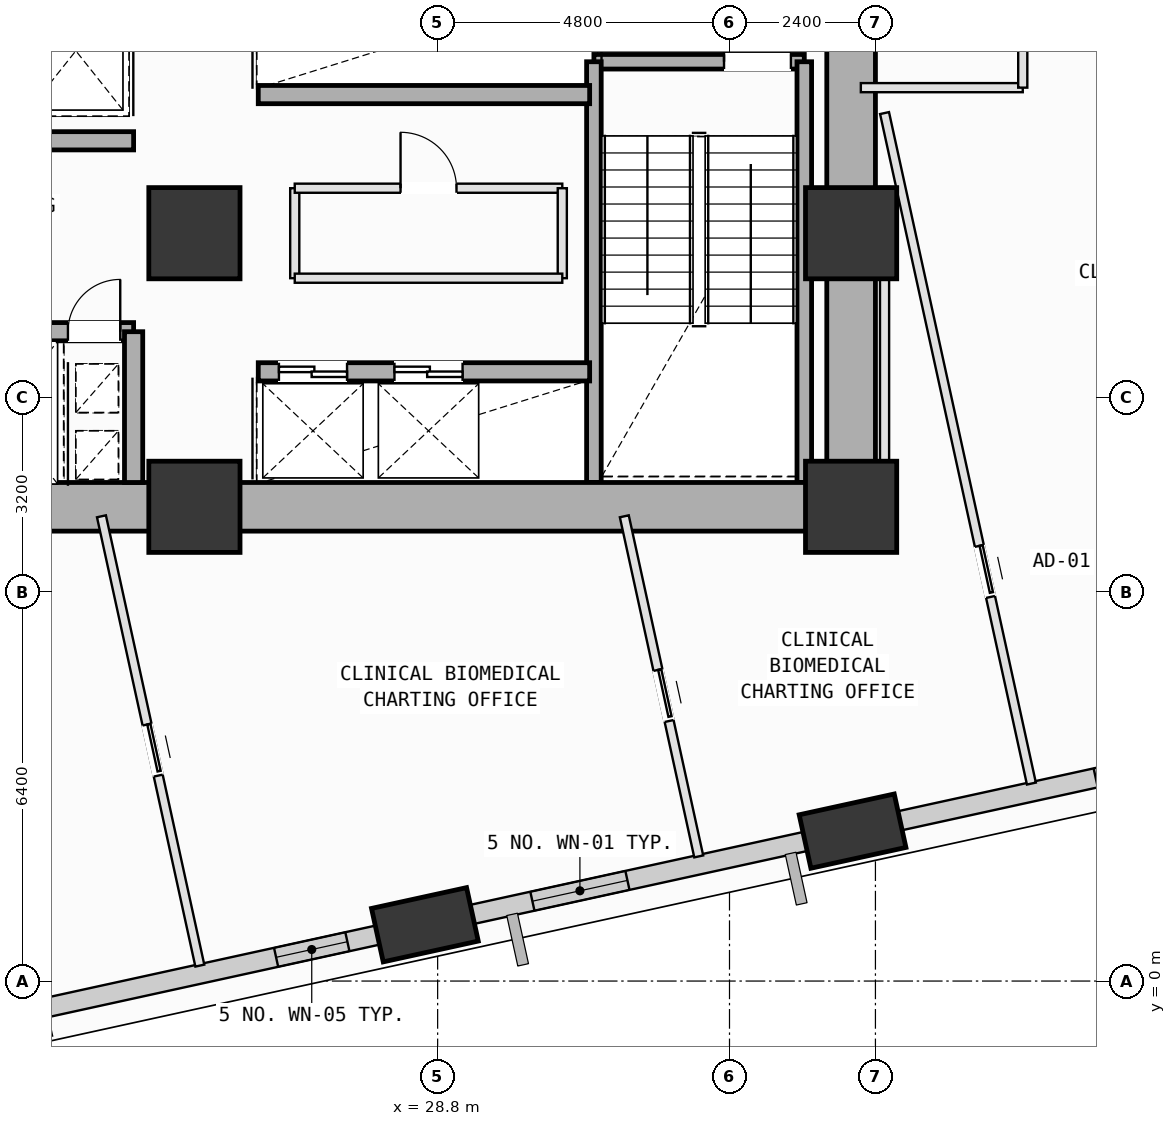
"""IFC4 building model, lengths in metres.
Left out: names, types, materials, properties, quantities, classifications, styles, units other than length and angle.
Written with IfcOpenShell. Run it as: python <this file> out.ifc"""

import sys

from ifc_helpers import new_model, si_unit, direction, frame, frame_2d, origin, origin_2d, place, context, subcontext, project, spatial, rectangle, extrude, element, fill, save


model = new_model("IFC4")
c1 = context("Model", 3, precision=1e-05, world=origin(), true_north=direction((0.0, 1.0)))
c2 = subcontext(c1, "Body", "Model", "MODEL_VIEW")
j1 = project(units=[si_unit("LENGTHUNIT", "METRE"), si_unit("PLANEANGLEUNIT", "RADIAN")], contexts=[c1])
p1 = place(None, origin())
s1 = spatial("IfcSite", under=j1, at=p1, CompositionType="ELEMENT")
p2 = place(p1, origin())
s2 = spatial("IfcBuilding", under=s1, at=p2, CompositionType="ELEMENT")
p3 = place(p2, frame((0.0, 0.0, 75.0)))
s3 = spatial("IfcBuildingStorey", under=s2, at=p3, CompositionType="ELEMENT", Elevation=75.0)
for number, where, z_axis, x_axis in (
    (1, (24.8, 7.8, 0.0), (0.0, 0.0, 1.0), (1.0, 0.0, 0.0)),
    (2, (24.8, 12.3, 0.0), (0.0, 0.0, 1.0), (1.0, 0.0, 0.0)),
    (3, (35.6, 7.8, 0.0), (0.0, 0.0, 1.0), (1.0, 0.0, 0.0)),
    (4, (35.6, 12.3, 0.0), (0.0, 0.0, 1.0), (1.0, 0.0, 0.0)),
):
    element("IfcColumn", number, at=place(p3, frame(where, z_axis=z_axis, x_axis=x_axis)), inside=s3, PredefinedType="COLUMN", context=c2, shape_type="SweptSolid", body=[
        extrude(rectangle(XDim=1.5, YDim=1.5, at=origin_2d()), origin(), (0.0, 0.0, 1.0), 4.0),
    ])
p4 = place(p3, frame((21.557, -0.614, 0.002), z_axis=(0.10503105755, -0.048723246223, 0.99327464592), x_axis=(0.218362783121, 0.975553406611, 0.024763800118)))
e5 = element("IfcColumn", 5, at=p4, inside=s3, PredefinedType="COLUMN", context=c2, shape_type="SweptSolid", body=[
    extrude(rectangle(XDim=1.6, YDim=0.9, at=origin_2d()), origin(), (0.0, 0.0, 1.0), 4.024),
])
p5 = place(p3, frame((28.591, 0.926, 0.002), z_axis=(0.098581386043, -0.019874299159, 0.994930511422), x_axis=(-0.015548115674, 0.999647745462, 0.021509093243)))
e6 = element("IfcColumn", 6, at=p5, inside=s3, PredefinedType="COLUMN", context=c2, shape_type="SweptSolid", body=[
    extrude(rectangle(XDim=1.6, YDim=0.9, at=origin_2d()), origin(), (0.0, 0.0, 1.0), 4.017),
])
p6 = place(p3, frame((35.624, 2.466, 0.002), z_axis=(0.092149700508, 0.009123732724, 0.995703364561), x_axis=(-0.308175869476, 0.951123215459, 0.019805617589)))
e7 = element("IfcColumn", 7, at=p6, inside=s3, PredefinedType="COLUMN", context=c2, shape_type="SweptSolid", body=[
    extrude(rectangle(XDim=1.6, YDim=0.9, at=origin_2d()), origin(), (0.0, 0.0, 1.0), 4.014),
])
p7 = place(p3, frame((28.183, 0.837, 0.0), z_axis=(0.0, 0.0, 1.0), x_axis=(-0.976853849755, -0.213907821782, 0.0)))
e8 = element("IfcWall", 8, at=p7, inside=s3, PredefinedType="SOLIDWALL", context=c2, shape_type="SweptSolid", body=[
    extrude(rectangle(XDim=6.006, YDim=0.32, at=frame_2d((3.003, 0.0))), origin(), (0.0, 0.0, 1.0), 3.165),
])
p8 = place(p7, frame((0.888, 0.0, 0.75)))
e9 = element("IfcOpeningElement", 9, at=p8, cuts=e8, PredefinedType="OPENING", context=c2, shape_type="SweptSolid", body=[
    extrude(rectangle(XDim=1.2, YDim=1.75, at=frame_2d((0.6, 0.875))), frame((0.0, 0.17, 0.0), z_axis=(0.0, -1.0, 0.0), x_axis=(1.0, 0.0, 0.0)), (0.0, 0.0, 1.0), 0.34),
])
p9 = place(p3, frame((35.211, 2.375, 0.0), z_axis=(0.0, 0.0, 1.0), x_axis=(-0.976862242803, -0.21386948961, 0.0)))
e10 = element("IfcWall", 10, at=p9, inside=s3, PredefinedType="SOLIDWALL", context=c2, shape_type="SweptSolid", body=[
    extrude(rectangle(XDim=5.99, YDim=0.32, at=frame_2d((2.995, 0.0))), origin(), (0.0, 0.0, 1.0), 3.165),
])
p10 = place(p9, frame((3.367, 0.0, 0.75)))
e11 = element("IfcOpeningElement", 11, at=p10, cuts=e10, PredefinedType="OPENING", context=c2, shape_type="SweptSolid", body=[
    extrude(rectangle(XDim=1.6, YDim=1.95, at=frame_2d((0.8, 0.975))), frame((0.0, 0.17, 0.0), z_axis=(0.0, -1.0, 0.0), x_axis=(1.0, 0.0, 0.0)), (0.0, 0.0, 1.0), 0.34),
])
p11 = place(p3, frame((42.244, 3.916, 0.0), z_axis=(0.0, 0.0, 1.0), x_axis=(-0.976864612663, -0.213858664838, 0.0)))
e12 = element("IfcWall", 12, at=p11, inside=s3, PredefinedType="SOLIDWALL", context=c2, shape_type="SweptSolid", body=[
    extrude(rectangle(XDim=5.985, YDim=0.32, at=frame_2d((2.993, 0.0))), origin(), (0.0, 0.0, 1.0), 3.165),
])
p12 = place(p11, frame((0.684, 0.0, 0.75)))
e13 = element("IfcOpeningElement", 13, at=p12, cuts=e12, PredefinedType="OPENING", context=c2, shape_type="SweptSolid", body=[
    extrude(rectangle(XDim=2.0, YDim=1.95, at=frame_2d((1.0, 0.975))), frame((0.0, 0.17, 0.0), z_axis=(0.0, -1.0, 0.0), x_axis=(1.0, 0.0, 0.0)), (0.0, 0.0, 1.0), 0.34),
])
p13 = place(p3, frame((31.37, 15.12, 0.0), z_axis=(0.0, 0.0, 1.0), x_axis=(1.0, 0.0, 0.0)))
e14 = element("IfcWall", 14, at=p13, inside=s3, PredefinedType="SOLIDWALL", context=c2, shape_type="SweptSolid", body=[
    extrude(rectangle(XDim=3.46, YDim=0.24, at=frame_2d((1.73, 0.0))), origin(), (0.0, 0.0, 1.0), 3.78),
])
p14 = place(p13, frame((2.14, 0.0, 0.0)))
e15 = element("IfcOpeningElement", 15, at=p14, cuts=e14, PredefinedType="OPENING", context=c2, shape_type="SweptSolid", body=[
    extrude(rectangle(XDim=1.1, YDim=2.15, at=frame_2d((0.55, 1.075))), frame((0.0, 0.13, 0.0), z_axis=(0.0, -1.0, 0.0), x_axis=(1.0, 0.0, 0.0)), (0.0, 0.0, 1.0), 0.26),
])
for number, where, z_axis, x_axis in (
    (16, (34.83, 15.12, 0.0), (0.0, 0.0, 1.0), (0.0, -1.0, 0.0)),
    (17, (31.37, 8.2, 0.0), (0.0, 0.0, 1.0), (0.0, 1.0, 0.0)),
):
    element("IfcWall", number, at=place(p3, frame(where, z_axis=z_axis, x_axis=x_axis)), inside=s3, PredefinedType="SOLIDWALL", context=c2, shape_type="SweptSolid", body=[
        extrude(rectangle(XDim=6.92, YDim=0.24, at=frame_2d((3.46, 0.0))), origin(), (0.0, 0.0, 1.0), 3.78),
    ])
for number, where, z_axis, x_axis in (
    (18, (14.0, 7.8, 0.0), (0.0, 0.0, 1.0), (1.0, 0.0, 0.0)),
    (19, (24.8, 7.8, 0.0), (0.0, 0.0, 1.0), (1.0, 0.0, 0.0)),
):
    element("IfcWall", number, at=place(p3, frame(where, z_axis=z_axis, x_axis=x_axis)), inside=s3, PredefinedType="SHEAR", context=c2, shape_type="SweptSolid", body=[
        extrude(rectangle(XDim=10.8, YDim=0.8, at=frame_2d((5.4, 0.0))), origin(), (0.0, 0.0, 1.0), 3.78),
    ])
p15 = place(p3, frame((35.6, 7.8, 0.0), z_axis=(0.0, 0.0, 1.0), x_axis=(0.0, 1.0, 0.0)))
e20 = element("IfcWall", 20, at=p15, inside=s3, PredefinedType="SHEAR", context=c2, shape_type="SweptSolid", body=[
    extrude(rectangle(XDim=9.0, YDim=0.8, at=frame_2d((4.5, 0.0))), origin(), (0.0, 0.0, 1.0), 3.78),
])
p16 = place(p3, frame((18.5, 10.68, 0.0), z_axis=(0.0, 0.0, 1.0), x_axis=(1.0, 0.0, 0.0)))
e21 = element("IfcWall", 21, at=p16, inside=s3, PredefinedType="SOLIDWALL", context=c2, shape_type="SweptSolid", body=[
    extrude(rectangle(XDim=5.3, YDim=0.3, at=frame_2d((2.65, 0.0))), origin(), (0.0, 0.0, 1.0), 3.78),
])
p17 = place(p16, frame((4.22, 0.0, 0.0)))
e22 = element("IfcOpeningElement", 22, at=p17, cuts=e21, PredefinedType="OPENING", context=c2, shape_type="SweptSolid", body=[
    extrude(rectangle(XDim=0.86, YDim=2.06, at=frame_2d((0.43, 1.03))), frame((0.0, 0.16, 0.0), z_axis=(0.0, -1.0, 0.0), x_axis=(1.0, 0.0, 0.0)), (0.0, 0.0, 1.0), 0.32),
])
p18 = place(p16, frame((0.425, 0.0, 0.0)))
e23 = element("IfcOpeningElement", 23, at=p18, cuts=e21, PredefinedType="OPENING", context=c2, shape_type="SweptSolid", body=[
    extrude(rectangle(XDim=1.25, YDim=2.18, at=frame_2d((0.625, 1.09))), frame((0.0, 0.16, 0.0), z_axis=(0.0, -1.0, 0.0), x_axis=(1.0, 0.0, 0.0)), (0.0, 0.0, 1.0), 0.32),
])
p19 = place(p16, frame((2.525, 0.0, 0.0)))
e24 = element("IfcOpeningElement", 24, at=p19, cuts=e21, PredefinedType="OPENING", context=c2, shape_type="SweptSolid", body=[
    extrude(rectangle(XDim=1.25, YDim=2.18, at=frame_2d((0.625, 1.09))), frame((0.0, 0.16, 0.0), z_axis=(0.0, -1.0, 0.0), x_axis=(1.0, 0.0, 0.0)), (0.0, 0.0, 1.0), 0.32),
])
p20 = place(p3, frame((18.5, 13.82, 0.0), z_axis=(0.0, 0.0, 1.0), x_axis=(1.0, 0.0, 0.0)))
e25 = element("IfcWall", 25, at=p20, inside=s3, PredefinedType="SOLIDWALL", context=c2, shape_type="SweptSolid", body=[
    extrude(rectangle(XDim=5.3, YDim=0.3, at=frame_2d((2.65, 0.0))), origin(), (0.0, 0.0, 1.0), 3.78),
])
p21 = place(p20, frame((0.18, 0.0, 0.0)))
e26 = element("IfcOpeningElement", 26, at=p21, cuts=e25, PredefinedType="OPENING", context=c2, shape_type="SweptSolid", body=[
    extrude(rectangle(XDim=1.1, YDim=2.15, at=frame_2d((0.55, 1.075))), frame((0.0, 0.16, 0.0), z_axis=(0.0, -1.0, 0.0), x_axis=(1.0, 0.0, 0.0)), (0.0, 0.0, 1.0), 0.32),
])
p22 = place(p3, frame((23.8, 8.2, 0.0), z_axis=(0.0, 0.0, 1.0), x_axis=(0.0, 1.0, 0.0)))
e27 = element("IfcWall", 27, at=p22, inside=s3, PredefinedType="SOLIDWALL", context=c2, shape_type="SweptSolid", body=[
    extrude(rectangle(XDim=2.48, YDim=0.3, at=frame_2d((1.24, 0.0))), origin(), (0.0, 0.0, 1.0), 3.78),
])
p23 = place(p3, frame((25.85, 10.02, 0.0), z_axis=(0.0, 0.0, 1.0), x_axis=(1.0, 0.0, 0.0)))
e28 = element("IfcWall", 28, at=p23, inside=s3, PredefinedType="SOLIDWALL", context=c2, shape_type="SweptSolid", body=[
    extrude(rectangle(XDim=5.45, YDim=0.3, at=frame_2d((2.725, 0.0))), origin(), (0.0, 0.0, 1.0), 3.78),
])
p24 = place(p23, frame((0.34, 0.0, 0.0)))
e29 = element("IfcOpeningElement", 29, at=p24, cuts=e28, PredefinedType="OPENING", context=c2, shape_type="SweptSolid", body=[
    extrude(rectangle(XDim=1.12, YDim=2.15, at=frame_2d((0.56, 1.075))), frame((0.0, 0.16, 0.0), z_axis=(0.0, -1.0, 0.0), x_axis=(1.0, 0.0, 0.0)), (0.0, 0.0, 1.0), 0.32),
])
p25 = place(p23, frame((2.24, 0.0, 0.0)))
e30 = element("IfcOpeningElement", 30, at=p25, cuts=e28, PredefinedType="OPENING", context=c2, shape_type="SweptSolid", body=[
    extrude(rectangle(XDim=1.12, YDim=2.15, at=frame_2d((0.56, 1.075))), frame((0.0, 0.16, 0.0), z_axis=(0.0, -1.0, 0.0), x_axis=(1.0, 0.0, 0.0)), (0.0, 0.0, 1.0), 0.32),
])
p26 = place(p3, frame((25.85, 14.58, 0.0), z_axis=(0.0, 0.0, 1.0), x_axis=(1.0, 0.0, 0.0)))
e31 = element("IfcWall", 31, at=p26, inside=s3, PredefinedType="SOLIDWALL", context=c2, shape_type="SweptSolid", body=[
    extrude(rectangle(XDim=5.45, YDim=0.3, at=frame_2d((2.725, 0.0))), origin(), (0.0, 0.0, 1.0), 3.78),
])
p27 = place(p3, frame((26.45, 11.56, 0.0), z_axis=(0.0, 0.0, 1.0), x_axis=(0.0, 1.0, 0.0)))
e32 = element("IfcWall", 32, at=p27, inside=s3, PredefinedType="PARTITIONING", context=c2, shape_type="SweptSolid", body=[
    extrude(rectangle(XDim=1.48, YDim=0.15, at=frame_2d((0.74, 0.0))), origin(), (0.0, 0.0, 1.0), 3.78),
])
p28 = place(p3, frame((26.45, 13.04, 0.0), z_axis=(0.0, 0.0, 1.0), x_axis=(1.0, 0.0, 0.0)))
e33 = element("IfcWall", 33, at=p28, inside=s3, PredefinedType="PARTITIONING", context=c2, shape_type="SweptSolid", body=[
    extrude(rectangle(XDim=4.4, YDim=0.15, at=frame_2d((2.2, 0.0))), origin(), (0.0, 0.0, 1.0), 3.78),
])
p29 = place(p28, frame((1.74, 0.0, 0.0)))
e34 = element("IfcOpeningElement", 34, at=p29, cuts=e33, PredefinedType="OPENING", context=c2, shape_type="SweptSolid", body=[
    extrude(rectangle(XDim=0.92, YDim=2.1, at=frame_2d((0.46, 1.05))), frame((0.0, 0.085, 0.0), z_axis=(0.0, -1.0, 0.0), x_axis=(1.0, 0.0, 0.0)), (0.0, 0.0, 1.0), 0.17),
])
p30 = place(p3, frame((30.85, 13.04, 0.0), z_axis=(0.0, 0.0, 1.0), x_axis=(0.0, -1.0, 0.0)))
e35 = element("IfcWall", 35, at=p30, inside=s3, PredefinedType="PARTITIONING", context=c2, shape_type="SweptSolid", body=[
    extrude(rectangle(XDim=1.48, YDim=0.15, at=frame_2d((0.74, 0.0))), origin(), (0.0, 0.0, 1.0), 3.78),
])
p31 = place(p3, frame((30.85, 11.56, 0.0), z_axis=(0.0, 0.0, 1.0), x_axis=(-1.0, 0.0, 0.0)))
e36 = element("IfcWall", 36, at=p31, inside=s3, PredefinedType="PARTITIONING", context=c2, shape_type="SweptSolid", body=[
    extrude(rectangle(XDim=4.4, YDim=0.15, at=frame_2d((2.2, 0.0))), origin(), (0.0, 0.0, 1.0), 3.78),
])
p32 = place(p3, frame((23.271, 7.644, 0.0), z_axis=(0.0, 0.0, 1.0), x_axis=(0.213864339453, -0.976863370339, 0.0)))
e37 = element("IfcWall", 37, at=p32, inside=s3, PredefinedType="PARTITIONING", context=c2, shape_type="SweptSolid", body=[
    extrude(rectangle(XDim=7.565, YDim=0.15, at=frame_2d((3.783, 0.0))), origin(), (0.0, 0.0, 1.0), 3.78),
])
p33 = place(p32, frame((3.506, 0.0, 0.0)))
e38 = element("IfcOpeningElement", 38, at=p33, cuts=e37, PredefinedType="OPENING", context=c2, shape_type="SweptSolid", body=[
    extrude(rectangle(XDim=0.86, YDim=2.06, at=frame_2d((0.43, 1.03))), frame((0.0, 0.085, 0.0), z_axis=(0.0, -1.0, 0.0), x_axis=(1.0, 0.0, 0.0)), (0.0, 0.0, 1.0), 0.17),
])
p34 = place(p3, frame((29.409, 0.87, 0.0), z_axis=(0.0, 0.0, 1.0), x_axis=(-0.976798127937, -0.214162128444, 0.0)))
e39 = element("IfcWall", 39, at=p34, inside=s3, PredefinedType="PARTITIONING", context=c2, shape_type="SweptSolid", body=[
    extrude(rectangle(XDim=1.205, YDim=0.15, at=frame_2d((0.603, 0.0))), origin(), (0.0, 0.0, 1.0), 3.165),
])
p35 = place(p3, frame((31.87, 7.644, 0.0), z_axis=(0.0, 0.0, 1.0), x_axis=(0.213728666116, -0.97689306338, 0.0)))
e40 = element("IfcWall", 40, at=p35, inside=s3, PredefinedType="PARTITIONING", context=c2, shape_type="SweptSolid", body=[
    extrude(rectangle(XDim=5.726, YDim=0.15, at=frame_2d((2.863, 0.0))), origin(), (0.0, 0.0, 1.0), 3.78),
])
p36 = place(p35, frame((2.587, 0.0, 0.0)))
e41 = element("IfcOpeningElement", 41, at=p36, cuts=e40, PredefinedType="OPENING", context=c2, shape_type="SweptSolid", body=[
    extrude(rectangle(XDim=0.86, YDim=2.06, at=frame_2d((0.43, 1.03))), frame((0.0, 0.085, 0.0), z_axis=(0.0, -1.0, 0.0), x_axis=(1.0, 0.0, 0.0)), (0.0, 0.0, 1.0), 0.17),
])
p37 = place(p3, frame((36.15, 14.276, 0.0), z_axis=(0.0, 0.0, 1.0), x_axis=(0.213925186331, -0.976850047168, 0.0)))
e42 = element("IfcWall", 42, at=p37, inside=s3, PredefinedType="PARTITIONING", context=c2, shape_type="SweptSolid", body=[
    extrude(rectangle(XDim=11.289, YDim=0.15, at=frame_2d((5.645, 0.0))), origin(), (0.0, 0.0, 1.0), 3.78),
])
p38 = place(p37, frame((7.287, 0.0, 0.0)))
e43 = element("IfcOpeningElement", 43, at=p38, cuts=e42, PredefinedType="OPENING", context=c2, shape_type="SweptSolid", body=[
    extrude(rectangle(XDim=0.86, YDim=2.06, at=frame_2d((0.43, 1.03))), frame((0.0, 0.085, 0.0), z_axis=(0.0, -1.0, 0.0), x_axis=(1.0, 0.0, 0.0)), (0.0, 0.0, 1.0), 0.17),
])
p39 = place(p3, frame((36.447, 2.411, 0.0), z_axis=(0.0, 0.0, 1.0), x_axis=(-0.976839685848, -0.213972493918, 0.0)))
e44 = element("IfcWall", 44, at=p39, inside=s3, PredefinedType="PARTITIONING", context=c2, shape_type="SweptSolid", body=[
    extrude(rectangle(XDim=1.215, YDim=0.15, at=frame_2d((0.607, 0.0))), origin(), (0.0, 0.0, 1.0), 3.165),
])
p40 = place(p3, frame((36.15, 7.5, 0.0), z_axis=(0.0, 0.0, 1.0), x_axis=(0.0, 1.0, 0.0)))
e45 = element("IfcWall", 45, at=p40, inside=s3, PredefinedType="PARTITIONING", context=c2, shape_type="SweptSolid", body=[
    extrude(rectangle(XDim=5.561, YDim=0.15, at=frame_2d((2.781, 0.0))), origin(), (0.0, 0.0, 1.0), 3.78),
])
p41 = place(p3, frame((35.76, 14.694, 0.0), z_axis=(0.0, 0.0, 1.0), x_axis=(1.0, 0.0, 0.0)))
e46 = element("IfcWall", 46, at=p41, inside=s3, PredefinedType="PARTITIONING", context=c2, shape_type="SweptSolid", body=[
    extrude(rectangle(XDim=2.663, YDim=0.15, at=frame_2d((1.332, 0.0))), origin(), (0.0, 0.0, 1.0), 3.78),
])
p42 = place(p3, frame((38.423, 14.694, 0.0), z_axis=(0.0, 0.0, 1.0), x_axis=(0.0, 1.0, 0.0)))
e47 = element("IfcWall", 47, at=p42, inside=s3, PredefinedType="PARTITIONING", context=c2, shape_type="SweptSolid", body=[
    extrude(rectangle(XDim=1.806, YDim=0.15, at=frame_2d((0.903, 0.0))), origin(), (0.0, 0.0, 1.0), 3.78),
])
p43 = place(p8, origin())
e48 = element("IfcWindow", 48, at=p43, inside=s3, PartitioningType="SINGLE_PANEL", PredefinedType="WINDOW", context=c2, shape_type="SweptSolid", body=[
    extrude(rectangle(XDim=1.2, YDim=1.75, at=frame_2d((0.6, 0.875))), frame((0.0, 0.03, 0.0), z_axis=(0.0, -1.0, 0.0), x_axis=(1.0, 0.0, 0.0)), (0.0, 0.0, 1.0), 0.06),
])
fill(e9, e48)
p44 = place(p10, origin())
e49 = element("IfcWindow", 49, at=p44, inside=s3, PartitioningType="SINGLE_PANEL", PredefinedType="WINDOW", context=c2, shape_type="SweptSolid", body=[
    extrude(rectangle(XDim=1.6, YDim=1.95, at=frame_2d((0.8, 0.975))), frame((0.0, 0.03, 0.0), z_axis=(0.0, -1.0, 0.0), x_axis=(1.0, 0.0, 0.0)), (0.0, 0.0, 1.0), 0.06),
])
fill(e11, e49)
p45 = place(p12, origin())
e50 = element("IfcWindow", 50, at=p45, inside=s3, PartitioningType="SINGLE_PANEL", PredefinedType="WINDOW", context=c2, shape_type="SweptSolid", body=[
    extrude(rectangle(XDim=2.0, YDim=1.95, at=frame_2d((1.0, 0.975))), frame((0.0, 0.03, 0.0), z_axis=(0.0, -1.0, 0.0), x_axis=(1.0, 0.0, 0.0)), (0.0, 0.0, 1.0), 0.06),
])
fill(e13, e50)
p46 = place(p14, origin())
e51 = element("IfcDoor", 51, at=p46, inside=s3, OperationType="SINGLE_SWING_LEFT", PredefinedType="DOOR", context=c2, shape_type="SweptSolid", body=[
    extrude(rectangle(XDim=1.1, YDim=2.15, at=frame_2d((0.55, 1.075))), frame((0.0, 0.025, 0.0), z_axis=(0.0, -1.0, 0.0), x_axis=(1.0, 0.0, 0.0)), (0.0, 0.0, 1.0), 0.05),
])
fill(e15, e51)
p47 = place(p17, origin())
e52 = element("IfcDoor", 52, at=p47, inside=s3, OperationType="SINGLE_SWING_RIGHT", PredefinedType="DOOR", context=c2, shape_type="SweptSolid", body=[
    extrude(rectangle(XDim=0.86, YDim=2.06, at=frame_2d((0.43, 1.03))), frame((0.0, 0.025, 0.0), z_axis=(0.0, -1.0, 0.0), x_axis=(1.0, 0.0, 0.0)), (0.0, 0.0, 1.0), 0.05),
])
fill(e22, e52)
p48 = place(p24, origin())
e53 = element("IfcDoor", 53, at=p48, inside=s3, OperationType="DOUBLE_DOOR_SLIDING", PredefinedType="DOOR", context=c2, shape_type="SweptSolid", body=[
    extrude(rectangle(XDim=1.12, YDim=2.15, at=frame_2d((0.56, 1.075))), frame((0.0, 0.025, 0.0), z_axis=(0.0, -1.0, 0.0), x_axis=(1.0, 0.0, 0.0)), (0.0, 0.0, 1.0), 0.05),
])
fill(e29, e53)
p49 = place(p25, origin())
e54 = element("IfcDoor", 54, at=p49, inside=s3, OperationType="DOUBLE_DOOR_SLIDING", PredefinedType="DOOR", context=c2, shape_type="SweptSolid", body=[
    extrude(rectangle(XDim=1.12, YDim=2.15, at=frame_2d((0.56, 1.075))), frame((0.0, 0.025, 0.0), z_axis=(0.0, -1.0, 0.0), x_axis=(1.0, 0.0, 0.0)), (0.0, 0.0, 1.0), 0.05),
])
fill(e30, e54)
p50 = place(p29, origin())
e55 = element("IfcDoor", 55, at=p50, inside=s3, OperationType="SINGLE_SWING_LEFT", PredefinedType="DOOR", context=c2, shape_type="SweptSolid", body=[
    extrude(rectangle(XDim=0.92, YDim=2.1, at=frame_2d((0.46, 1.05))), frame((0.0, 0.025, 0.0), z_axis=(0.0, -1.0, 0.0), x_axis=(1.0, 0.0, 0.0)), (0.0, 0.0, 1.0), 0.05),
])
fill(e34, e55)
p51 = place(p38, origin())
e56 = element("IfcDoor", 56, at=p51, inside=s3, OperationType="SLIDING_TO_LEFT", PredefinedType="DOOR", context=c2, shape_type="SweptSolid", body=[
    extrude(rectangle(XDim=0.86, YDim=2.06, at=frame_2d((0.43, 1.03))), frame((0.0, 0.025, 0.0), z_axis=(0.0, -1.0, 0.0), x_axis=(1.0, 0.0, 0.0)), (0.0, 0.0, 1.0), 0.05),
])
fill(e43, e56)
p52 = place(p36, origin())
e57 = element("IfcDoor", 57, at=p52, inside=s3, OperationType="SLIDING_TO_LEFT", PredefinedType="DOOR", context=c2, shape_type="SweptSolid", body=[
    extrude(rectangle(XDim=0.86, YDim=2.06, at=frame_2d((0.43, 1.03))), frame((0.0, 0.025, 0.0), z_axis=(0.0, -1.0, 0.0), x_axis=(1.0, 0.0, 0.0)), (0.0, 0.0, 1.0), 0.05),
])
fill(e41, e57)
p53 = place(p33, origin())
e58 = element("IfcDoor", 58, at=p53, inside=s3, OperationType="SLIDING_TO_LEFT", PredefinedType="DOOR", context=c2, shape_type="SweptSolid", body=[
    extrude(rectangle(XDim=0.86, YDim=2.06, at=frame_2d((0.43, 1.03))), frame((0.0, 0.025, 0.0), z_axis=(0.0, -1.0, 0.0), x_axis=(1.0, 0.0, 0.0)), (0.0, 0.0, 1.0), 0.05),
])
fill(e38, e58)
save(model, sys.argv[1])
